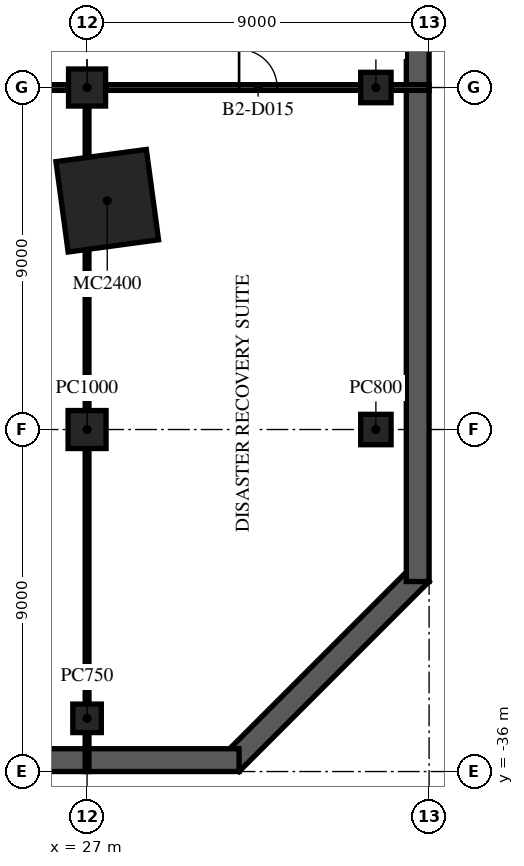
"""IFC4 building model, lengths in metres.
Left out: names, types, materials, properties, quantities, classifications, styles, units other than length and angle.
Written with IfcOpenShell. Run it as: python <this file> out.ifc"""

import sys

from ifc_helpers import new_model, si_unit, direction, frame, frame_2d, origin, origin_2d, place, context, subcontext, project, spatial, rectangle, extrude, element, fill, save


model = new_model("IFC4")
c1 = context("Model", 3, precision=1e-05, world=origin(), true_north=direction((0.0, 1.0)))
c2 = subcontext(c1, "Body", "Model", "MODEL_VIEW")
j1 = project(units=[si_unit("LENGTHUNIT", "METRE"), si_unit("PLANEANGLEUNIT", "RADIAN")], contexts=[c1])
p1 = place(None, origin())
s1 = spatial("IfcSite", under=j1, at=p1, CompositionType="ELEMENT")
p2 = place(p1, origin())
s2 = spatial("IfcBuilding", under=s1, at=p2, CompositionType="ELEMENT")
p3 = place(p2, frame((0.0, 0.0, -9.0)))
s3 = spatial("IfcBuildingStorey", under=s2, at=p3, CompositionType="ELEMENT", Elevation=-9.0)
p4 = place(p3, frame((30.788, -35.788, -0.3), z_axis=(0.0, 0.0, 1.0), x_axis=(0.707106781187, 0.707106781187, 0.0)))
e1 = element("IfcWall", 1, at=p4, inside=s3, PredefinedType="SOLIDWALL", context=c2, shape_type="SweptSolid", body=[
    extrude(rectangle(XDim=7.071, YDim=0.6, at=frame_2d((3.536, 0.0))), origin(), (0.0, 0.0, 1.0), 4.5),
])
for number, where, z_axis, x_axis in (
    (2, (35.7, -31.0, -0.3), (0.0, 0.0, 1.0), (0.0, 1.0, 0.0)),
    (3, (-31.0, -35.7, -0.3), (0.0, 0.0, 1.0), (1.0, 0.0, 0.0)),
):
    element("IfcWall", number, at=place(p3, frame(where, z_axis=z_axis, x_axis=x_axis)), inside=s3, PredefinedType="SOLIDWALL", context=c2, shape_type="SweptSolid", body=[
        extrude(rectangle(XDim=62.0, YDim=0.6, at=frame_2d((31.0, 0.0))), origin(), (0.0, 0.0, 1.0), 4.5),
    ])
p5 = place(p3, frame((27.0, -34.6, -0.3), z_axis=(0.0, 0.0, 1.0), x_axis=(1.0, 0.0, 0.0)))
e4 = element("IfcColumn", 4, at=p5, inside=s3, PredefinedType="COLUMN", context=c2, shape_type="SweptSolid", body=[
    extrude(rectangle(XDim=0.75, YDim=0.75, at=origin_2d()), origin(), (0.0, 0.0, 1.0), 4.8),
])
p6 = place(p3, frame((27.0, -27.0, -0.3), z_axis=(0.0, 0.0, 1.0), x_axis=(1.0, 0.0, 0.0)))
e5 = element("IfcColumn", 5, at=p6, inside=s3, PredefinedType="COLUMN", context=c2, shape_type="SweptSolid", body=[
    extrude(rectangle(XDim=1.0, YDim=1.0, at=origin_2d()), origin(), (0.0, 0.0, 1.0), 4.8),
])
p7 = place(p3, frame((27.0, -18.0, -0.3), z_axis=(0.0, 0.0, 1.0), x_axis=(1.0, 0.0, 0.0)))
e6 = element("IfcColumn", 6, at=p7, inside=s3, PredefinedType="COLUMN", context=c2, shape_type="SweptSolid", body=[
    extrude(rectangle(XDim=0.975, YDim=0.975, at=origin_2d()), origin(), (0.0, 0.0, 1.0), 4.8),
])
for number, where, z_axis, x_axis in (
    (7, (34.6, -27.0, -0.3), (0.0, 0.0, 1.0), (1.0, 0.0, 0.0)),
    (8, (34.6, -18.0, -0.3), (0.0, 0.0, 1.0), (1.0, 0.0, 0.0)),
):
    element("IfcColumn", number, at=place(p3, frame(where, z_axis=z_axis, x_axis=x_axis)), inside=s3, PredefinedType="COLUMN", context=c2, shape_type="SweptSolid", body=[
        extrude(rectangle(XDim=0.8, YDim=0.8, at=origin_2d()), origin(), (0.0, 0.0, 1.0), 4.8),
    ])
p8 = place(p3, frame((27.531, -20.979, -0.3), z_axis=(0.0, 0.0, 1.0), x_axis=(0.991001197216, 0.133853005627, 0.0)))
e9 = element("IfcColumn", 9, at=p8, inside=s3, PredefinedType="COLUMN", context=c2, shape_type="SweptSolid", body=[
    extrude(rectangle(XDim=2.4, YDim=2.4, at=origin_2d()), origin(), (0.0, 0.0, 1.0), 4.8),
])
p9 = place(p3, frame((18.5, -18.0, 0.0), z_axis=(0.0, 0.0, 1.0), x_axis=(1.0, 0.0, 0.0)))
e10 = element("IfcWall", 10, at=p9, inside=s3, PredefinedType="PARTITIONING", context=c2, shape_type="SweptSolid", body=[
    extrude(rectangle(XDim=8.0, YDim=0.15, at=frame_2d((4.0, 0.0))), origin(), (0.0, 0.0, 1.0), 4.2),
])
p10 = place(p9, frame((3.5, 0.0, 0.0)))
e11 = element("IfcOpeningElement", 11, at=p10, cuts=e10, PredefinedType="OPENING", context=c2, shape_type="SweptSolid", body=[
    extrude(rectangle(XDim=1.0, YDim=2.1, at=frame_2d((0.5, 1.05))), frame((0.0, 0.085, 0.0), z_axis=(0.0, -1.0, 0.0), x_axis=(1.0, 0.0, 0.0)), (0.0, 0.0, 1.0), 0.17),
])
p11 = place(p3, frame((27.5, -18.0, 0.0), z_axis=(0.0, 0.0, 1.0), x_axis=(1.0, 0.0, 0.0)))
e12 = element("IfcWall", 12, at=p11, inside=s3, PredefinedType="PARTITIONING", context=c2, shape_type="SweptSolid", body=[
    extrude(rectangle(XDim=8.5, YDim=0.15, at=frame_2d((4.25, 0.0))), origin(), (0.0, 0.0, 1.0), 4.2),
])
p12 = place(p11, frame((3.5, 0.0, 0.0)))
e13 = element("IfcOpeningElement", 13, at=p12, cuts=e12, PredefinedType="OPENING", context=c2, shape_type="SweptSolid", body=[
    extrude(rectangle(XDim=1.0, YDim=2.1, at=frame_2d((0.5, 1.05))), frame((0.0, 0.085, 0.0), z_axis=(0.0, -1.0, 0.0), x_axis=(1.0, 0.0, 0.0)), (0.0, 0.0, 1.0), 0.17),
])
p13 = place(p3, frame((27.0, -36.0, 0.0), z_axis=(0.0, 0.0, 1.0), x_axis=(0.0, 1.0, 0.0)))
e14 = element("IfcWall", 14, at=p13, inside=s3, PredefinedType="PARTITIONING", context=c2, shape_type="SweptSolid", body=[
    extrude(rectangle(XDim=8.5, YDim=0.1, at=frame_2d((4.25, 0.0))), origin(), (0.0, 0.0, 1.0), 4.2),
])
p14 = place(p3, frame((27.0, -26.5, 0.0), z_axis=(0.0, 0.0, 1.0), x_axis=(0.0, 1.0, 0.0)))
e15 = element("IfcWall", 15, at=p14, inside=s3, PredefinedType="PARTITIONING", context=c2, shape_type="SweptSolid", body=[
    extrude(rectangle(XDim=4.284, YDim=0.1, at=frame_2d((2.142, 0.0))), origin(), (0.0, 0.0, 1.0), 4.2),
])
p15 = place(p3, frame((27.0, -19.742, 0.0), z_axis=(0.0, 0.0, 1.0), x_axis=(0.0, 1.0, 0.0)))
e16 = element("IfcWall", 16, at=p15, inside=s3, PredefinedType="PARTITIONING", context=c2, shape_type="SweptSolid", body=[
    extrude(rectangle(XDim=1.242, YDim=0.1, at=frame_2d((0.621, 0.0))), origin(), (0.0, 0.0, 1.0), 4.2),
])
p16 = place(p12, origin())
e17 = element("IfcDoor", 17, at=p16, inside=s3, OperationType="SINGLE_SWING_LEFT", PredefinedType="DOOR", context=c2, shape_type="SweptSolid", body=[
    extrude(rectangle(XDim=1.0, YDim=2.1, at=frame_2d((0.5, 1.05))), frame((0.0, 0.025, 0.0), z_axis=(0.0, -1.0, 0.0), x_axis=(1.0, 0.0, 0.0)), (0.0, 0.0, 1.0), 0.05),
])
fill(e13, e17)
save(model, sys.argv[1])
